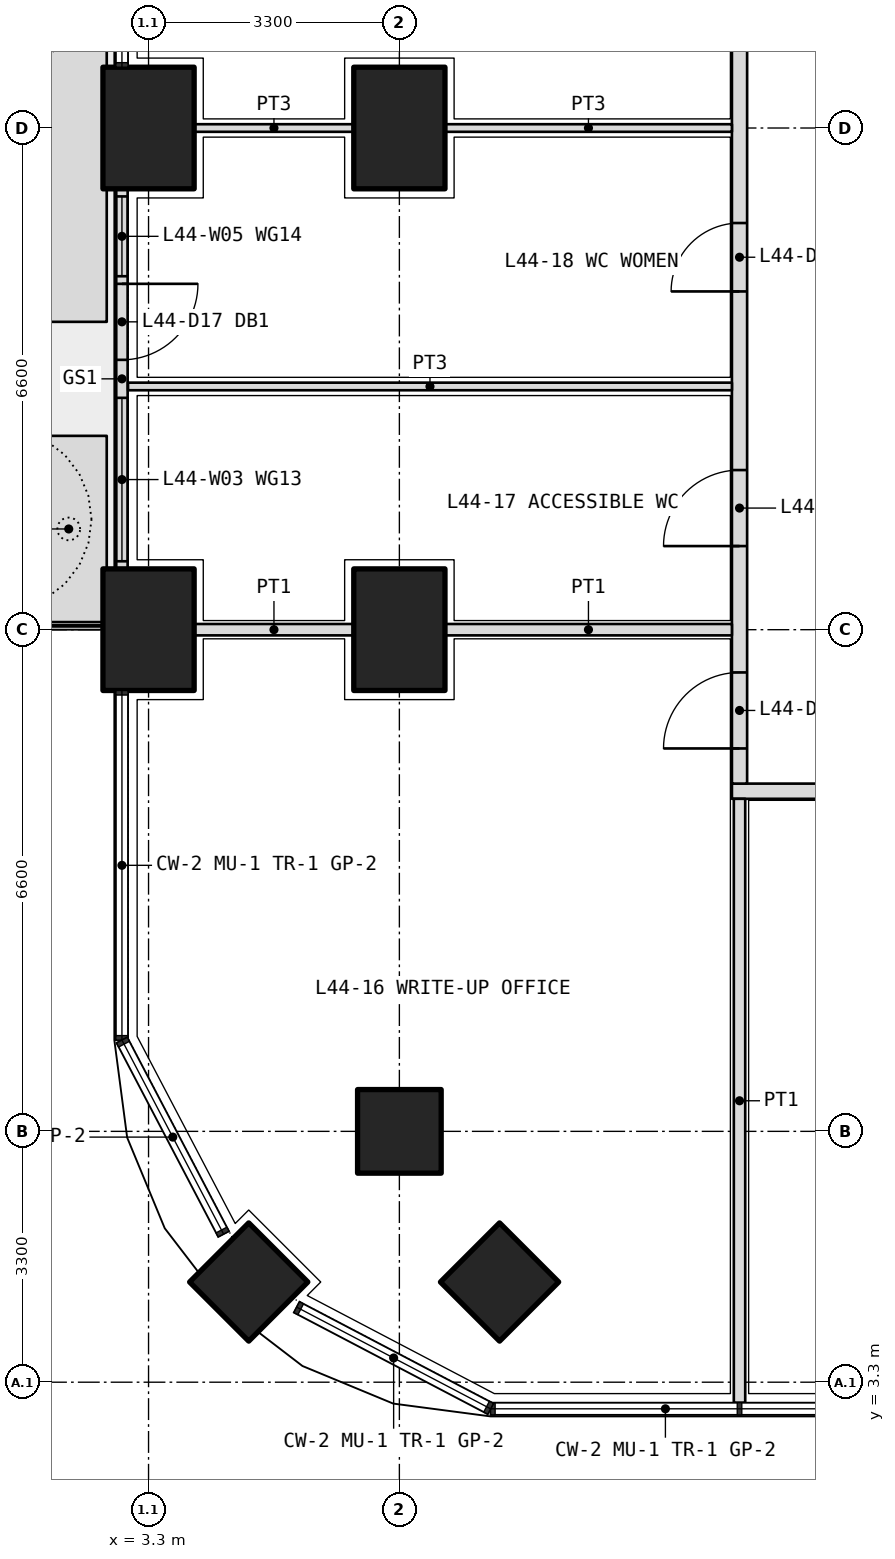
"""IFC4 building model, lengths in metres.
Left out: names, types, materials, properties, quantities, classifications, styles, units other than length and angle.
Written with IfcOpenShell. Run it as: python <this file> out.ifc"""

import sys

from ifc_helpers import new_model, si_unit, direction, frame, frame_2d, origin, origin_2d, place, context, subcontext, project, spatial, polyline, rectangle, outline, extrude, element, fill, save


model = new_model("IFC4")
c1 = context("Model", 3, precision=1e-05, world=origin(), true_north=direction((0.0, 1.0)))
c2 = subcontext(c1, "Body", "Model", "MODEL_VIEW")
j1 = project(units=[si_unit("LENGTHUNIT", "METRE"), si_unit("PLANEANGLEUNIT", "RADIAN")], contexts=[c1])
p1 = place(None, origin())
s1 = spatial("IfcSite", under=j1, at=p1, CompositionType="ELEMENT")
p2 = place(p1, origin())
s2 = spatial("IfcBuilding", under=s1, at=p2, CompositionType="ELEMENT")
p3 = place(p2, frame((0.0, 0.0, 193.5)))
s3 = spatial("IfcBuildingStorey", under=s2, at=p3, CompositionType="ELEMENT", Elevation=193.5)
p4 = place(p3, frame((4.618, 4.618, 0.0), z_axis=(0.0, 0.0, 1.0), x_axis=(0.707106781187, 0.707106781187, 0.0)))
e1 = element("IfcColumn", 1, at=p4, inside=s3, PredefinedType="COLUMN", context=c2, shape_type="SweptSolid", body=[
    extrude(rectangle(XDim=1.1, YDim=1.1, at=origin_2d()), origin(), (0.0, 0.0, 1.0), 4.2),
])
for number, where, z_axis, x_axis in (
    (2, (3.3, 13.2, 0.0), (0.0, 0.0, 1.0), (0.0, 1.0, 0.0)),
    (3, (3.3, 19.8, 0.0), (0.0, 0.0, 1.0), (0.0, 1.0, 0.0)),
):
    element("IfcColumn", number, at=place(p3, frame(where, z_axis=z_axis, x_axis=x_axis)), inside=s3, PredefinedType="COLUMN", context=c2, shape_type="SweptSolid", body=[
        extrude(rectangle(XDim=1.6, YDim=1.2, at=origin_2d()), origin(), (0.0, 0.0, 1.0), 4.2),
    ])
for number, where, z_axis, x_axis in (
    (4, (6.6, 6.6, 0.0), (0.0, 0.0, 1.0), (1.0, 0.0, 0.0)),
    (5, (7.918, 4.618, 0.0), (0.0, 0.0, 1.0), (0.707, 0.707, 0.0)),
):
    element("IfcColumn", number, at=place(p3, frame(where, z_axis=z_axis, x_axis=x_axis)), inside=s3, PredefinedType="COLUMN", context=c2, shape_type="SweptSolid", body=[
        extrude(rectangle(XDim=1.1, YDim=1.1, at=origin_2d()), origin(), (0.0, 0.0, 1.0), 4.2),
    ])
for number, where, z_axis, x_axis in (
    (6, (6.6, 13.2, 0.0), (0.0, 0.0, 1.0), (0.0, 1.0, 0.0)),
    (7, (6.6, 19.8, 0.0), (0.0, 0.0, 1.0), (0.0, 1.0, 0.0)),
):
    element("IfcColumn", number, at=place(p3, frame(where, z_axis=z_axis, x_axis=x_axis)), inside=s3, PredefinedType="COLUMN", context=c2, shape_type="SweptSolid", body=[
        extrude(rectangle(XDim=1.6, YDim=1.2, at=origin_2d()), origin(), (0.0, 0.0, 1.0), 4.2),
    ])
p5 = place(p3, origin())
e8 = element("IfcWall", 8, at=p5, inside=s3, PredefinedType="USERDEFINED", context=c2, shape_type="SweptSolid", body=[
    extrude(outline(polyline([(1.75, 13.3), (2.75, 13.3), (2.75, 15.75), (1.75, 15.75), (1.75, 13.3)]), holes=[polyline([(1.9, 13.45), (2.6, 13.45), (2.6, 15.6), (1.9, 15.6), (1.9, 13.45)])]), origin(), (0.0, 0.0, 1.0), 1.05),
])
p6 = place(p3, origin())
e9 = element("IfcWall", 9, at=p6, inside=s3, PredefinedType="USERDEFINED", context=c2, shape_type="SweptSolid", body=[
    extrude(outline(polyline([(1.75, 17.25), (2.75, 17.25), (2.75, 26.3), (1.75, 26.3), (1.75, 17.25)]), holes=[polyline([(1.9, 17.4), (2.6, 17.4), (2.6, 26.15), (1.9, 26.15), (1.9, 17.4)])]), origin(), (0.0, 0.0, 1.0), 1.05),
])
p7 = place(p3, frame((2.95, 19.0, 0.0), z_axis=(0.0, 0.0, 1.0), x_axis=(0.0, -1.0, 0.0)))
e10 = element("IfcWall", 10, at=p7, inside=s3, PredefinedType="SOLIDWALL", context=c2, shape_type="SweptSolid", body=[
    extrude(rectangle(XDim=5.0, YDim=0.15, at=frame_2d((2.5, 0.0))), origin(), (0.0, 0.0, 1.0), 2.7),
])
p8 = place(p7, frame((1.25, 0.0, 0.0)))
e11 = element("IfcOpeningElement", 11, at=p8, cuts=e10, PredefinedType="OPENING", context=c2, shape_type="SweptSolid", body=[
    extrude(rectangle(XDim=1.0, YDim=2.4, at=frame_2d((0.5, 1.2))), frame((0.0, 0.085, 0.0), z_axis=(0.0, -1.0, 0.0), x_axis=(1.0, 0.0, 0.0)), (0.0, 0.0, 1.0), 0.17),
])
p9 = place(p7, frame((0.1, 0.0, 0.1)))
e12 = element("IfcOpeningElement", 12, at=p9, cuts=e10, PredefinedType="OPENING", context=c2, shape_type="SweptSolid", body=[
    extrude(rectangle(XDim=1.05, YDim=2.3, at=frame_2d((0.525, 1.15))), frame((0.0, 0.085, 0.0), z_axis=(0.0, -1.0, 0.0), x_axis=(1.0, 0.0, 0.0)), (0.0, 0.0, 1.0), 0.17),
])
p10 = place(p7, frame((2.75, 0.0, 0.1)))
e13 = element("IfcOpeningElement", 13, at=p10, cuts=e10, PredefinedType="OPENING", context=c2, shape_type="SweptSolid", body=[
    extrude(rectangle(XDim=2.15, YDim=2.3, at=frame_2d((1.075, 1.15))), frame((0.0, 0.085, 0.0), z_axis=(0.0, -1.0, 0.0), x_axis=(1.0, 0.0, 0.0)), (0.0, 0.0, 1.0), 0.17),
])
p11 = place(p3, frame((10.975, 11.075, 0.0), z_axis=(0.0, 0.0, 1.0), x_axis=(1.0, 0.0, 0.0)))
e14 = element("IfcWall", 14, at=p11, inside=s3, PredefinedType="PARTITIONING", context=c2, shape_type="SweptSolid", body=[
    extrude(rectangle(XDim=30.85, YDim=0.2, at=frame_2d((15.425, 0.0))), origin(), (0.0, 0.0, 1.0), 2.85),
])
p12 = place(p11, frame((5.512, 0.0, 0.0)))
e15 = element("IfcOpeningElement", 15, at=p12, cuts=e14, PredefinedType="OPENING", context=c2, shape_type="SweptSolid", body=[
    extrude(rectangle(XDim=1.2, YDim=2.1, at=frame_2d((0.6, 1.05))), frame((0.0, 0.11, 0.0), z_axis=(0.0, -1.0, 0.0), x_axis=(1.0, 0.0, 0.0)), (0.0, 0.0, 1.0), 0.22),
])
p13 = place(p11, frame((13.725, 0.0, 0.0)))
e16 = element("IfcOpeningElement", 16, at=p13, cuts=e14, PredefinedType="OPENING", context=c2, shape_type="SweptSolid", body=[
    extrude(rectangle(XDim=1.0, YDim=2.1, at=frame_2d((0.5, 1.05))), frame((0.0, 0.11, 0.0), z_axis=(0.0, -1.0, 0.0), x_axis=(1.0, 0.0, 0.0)), (0.0, 0.0, 1.0), 0.22),
])
p14 = place(p11, frame((17.025, 0.0, 0.0)))
e17 = element("IfcOpeningElement", 17, at=p14, cuts=e14, PredefinedType="OPENING", context=c2, shape_type="SweptSolid", body=[
    extrude(rectangle(XDim=1.0, YDim=2.1, at=frame_2d((0.5, 1.05))), frame((0.0, 0.11, 0.0), z_axis=(0.0, -1.0, 0.0), x_axis=(1.0, 0.0, 0.0)), (0.0, 0.0, 1.0), 0.22),
])
p15 = place(p11, frame((24.238, 0.0, 0.0)))
e18 = element("IfcOpeningElement", 18, at=p15, cuts=e14, PredefinedType="OPENING", context=c2, shape_type="SweptSolid", body=[
    extrude(rectangle(XDim=1.0, YDim=2.1, at=frame_2d((0.5, 1.05))), frame((0.0, 0.11, 0.0), z_axis=(0.0, -1.0, 0.0), x_axis=(1.0, 0.0, 0.0)), (0.0, 0.0, 1.0), 0.22),
])
p16 = place(p3, frame((11.075, 11.175, 0.0), z_axis=(0.0, 0.0, 1.0), x_axis=(0.0, 1.0, 0.0)))
e19 = element("IfcWall", 19, at=p16, inside=s3, PredefinedType="PARTITIONING", context=c2, shape_type="SweptSolid", body=[
    extrude(rectangle(XDim=23.85, YDim=0.2, at=frame_2d((11.925, 0.0))), origin(), (0.0, 0.0, 1.0), 2.85),
])
p17 = place(p16, frame((0.462, 0.0, 0.0)))
e20 = element("IfcOpeningElement", 20, at=p17, cuts=e19, PredefinedType="OPENING", context=c2, shape_type="SweptSolid", body=[
    extrude(rectangle(XDim=1.0, YDim=2.1, at=frame_2d((0.5, 1.05))), frame((0.0, 0.11, 0.0), z_axis=(0.0, -1.0, 0.0), x_axis=(1.0, 0.0, 0.0)), (0.0, 0.0, 1.0), 0.22),
])
p18 = place(p16, frame((3.125, 0.0, 0.0)))
e21 = element("IfcOpeningElement", 21, at=p18, cuts=e19, PredefinedType="OPENING", context=c2, shape_type="SweptSolid", body=[
    extrude(rectangle(XDim=1.0, YDim=2.1, at=frame_2d((0.5, 1.05))), frame((0.0, 0.11, 0.0), z_axis=(0.0, -1.0, 0.0), x_axis=(1.0, 0.0, 0.0)), (0.0, 0.0, 1.0), 0.22),
])
p19 = place(p16, frame((6.475, 0.0, 0.0)))
e22 = element("IfcOpeningElement", 22, at=p19, cuts=e19, PredefinedType="OPENING", context=c2, shape_type="SweptSolid", body=[
    extrude(rectangle(XDim=0.9, YDim=2.1, at=frame_2d((0.45, 1.05))), frame((0.0, 0.11, 0.0), z_axis=(0.0, -1.0, 0.0), x_axis=(1.0, 0.0, 0.0)), (0.0, 0.0, 1.0), 0.22),
])
p20 = place(p16, frame((9.675, 0.0, 0.0)))
e23 = element("IfcOpeningElement", 23, at=p20, cuts=e19, PredefinedType="OPENING", context=c2, shape_type="SweptSolid", body=[
    extrude(rectangle(XDim=0.9, YDim=2.1, at=frame_2d((0.45, 1.05))), frame((0.0, 0.11, 0.0), z_axis=(0.0, -1.0, 0.0), x_axis=(1.0, 0.0, 0.0)), (0.0, 0.0, 1.0), 0.22),
])
p21 = place(p16, frame((12.925, 0.0, 0.0)))
e24 = element("IfcOpeningElement", 24, at=p21, cuts=e19, PredefinedType="OPENING", context=c2, shape_type="SweptSolid", body=[
    extrude(rectangle(XDim=1.0, YDim=2.1, at=frame_2d((0.5, 1.05))), frame((0.0, 0.11, 0.0), z_axis=(0.0, -1.0, 0.0), x_axis=(1.0, 0.0, 0.0)), (0.0, 0.0, 1.0), 0.22),
])
p22 = place(p16, frame((17.925, 0.0, 0.0)))
e25 = element("IfcOpeningElement", 25, at=p22, cuts=e19, PredefinedType="OPENING", context=c2, shape_type="SweptSolid", body=[
    extrude(rectangle(XDim=1.2, YDim=2.1, at=frame_2d((0.6, 1.05))), frame((0.0, 0.11, 0.0), z_axis=(0.0, -1.0, 0.0), x_axis=(1.0, 0.0, 0.0)), (0.0, 0.0, 1.0), 0.22),
])
p23 = place(p16, frame((22.288, 0.0, 0.0)))
e26 = element("IfcOpeningElement", 26, at=p23, cuts=e19, PredefinedType="OPENING", context=c2, shape_type="SweptSolid", body=[
    extrude(rectangle(XDim=1.2, YDim=2.1, at=frame_2d((0.6, 1.05))), frame((0.0, 0.11, 0.0), z_axis=(0.0, -1.0, 0.0), x_axis=(1.0, 0.0, 0.0)), (0.0, 0.0, 1.0), 0.22),
])
p24 = place(p3, frame((11.075, 3.03, 0.0), z_axis=(0.0, 0.0, 1.0), x_axis=(0.0, 1.0, 0.0)))
e27 = element("IfcWall", 27, at=p24, inside=s3, PredefinedType="PARTITIONING", context=c2, shape_type="SweptSolid", body=[
    extrude(rectangle(XDim=7.945, YDim=0.15, at=frame_2d((3.973, 0.0))), origin(), (0.0, 0.0, 1.0), 2.7),
])
p25 = place(p3, frame((3.03, 16.4, 0.0), z_axis=(0.0, 0.0, 1.0), x_axis=(1.0, 0.0, 0.0)))
e28 = element("IfcWall", 28, at=p25, inside=s3, PredefinedType="PARTITIONING", context=c2, shape_type="SweptSolid", body=[
    extrude(rectangle(XDim=7.945, YDim=0.1, at=frame_2d((3.973, 0.0))), origin(), (0.0, 0.0, 1.0), 2.7),
])
p26 = place(p3, frame((3.9, 19.8, 0.0), z_axis=(0.0, 0.0, 1.0), x_axis=(1.0, 0.0, 0.0)))
e29 = element("IfcWall", 29, at=p26, inside=s3, PredefinedType="PARTITIONING", context=c2, shape_type="SweptSolid", body=[
    extrude(rectangle(XDim=2.1, YDim=0.1, at=frame_2d((1.05, 0.0))), origin(), (0.0, 0.0, 1.0), 2.85),
])
p27 = place(p3, frame((7.2, 19.8, 0.0), z_axis=(0.0, 0.0, 1.0), x_axis=(1.0, 0.0, 0.0)))
e30 = element("IfcWall", 30, at=p27, inside=s3, PredefinedType="PARTITIONING", context=c2, shape_type="SweptSolid", body=[
    extrude(rectangle(XDim=3.775, YDim=0.1, at=frame_2d((1.888, 0.0))), origin(), (0.0, 0.0, 1.0), 2.85),
])
p28 = place(p3, frame((3.9, 13.2, 0.0), z_axis=(0.0, 0.0, 1.0), x_axis=(1.0, 0.0, 0.0)))
e31 = element("IfcWall", 31, at=p28, inside=s3, PredefinedType="PARTITIONING", context=c2, shape_type="SweptSolid", body=[
    extrude(rectangle(XDim=2.1, YDim=0.15, at=frame_2d((1.05, 0.0))), origin(), (0.0, 0.0, 1.0), 2.85),
])
p29 = place(p3, frame((7.2, 13.2, 0.0), z_axis=(0.0, 0.0, 1.0), x_axis=(1.0, 0.0, 0.0)))
e32 = element("IfcWall", 32, at=p29, inside=s3, PredefinedType="PARTITIONING", context=c2, shape_type="SweptSolid", body=[
    extrude(rectangle(XDim=3.775, YDim=0.15, at=frame_2d((1.888, 0.0))), origin(), (0.0, 0.0, 1.0), 2.85),
])
p30 = place(p8, origin())
e33 = element("IfcDoor", 33, at=p30, inside=s3, OperationType="SINGLE_SWING_LEFT", PredefinedType="DOOR", context=c2, shape_type="SweptSolid", body=[
    extrude(rectangle(XDim=1.0, YDim=2.4, at=frame_2d((0.5, 1.2))), frame((0.0, 0.025, 0.0), z_axis=(0.0, -1.0, 0.0), x_axis=(1.0, 0.0, 0.0)), (0.0, 0.0, 1.0), 0.05),
])
fill(e11, e33)
p31 = place(p9, origin())
e34 = element("IfcWindow", 34, at=p31, inside=s3, PartitioningType="SINGLE_PANEL", PredefinedType="WINDOW", context=c2, shape_type="SweptSolid", body=[
    extrude(rectangle(XDim=1.05, YDim=2.3, at=frame_2d((0.525, 1.15))), frame((0.0, 0.03, 0.0), z_axis=(0.0, -1.0, 0.0), x_axis=(1.0, 0.0, 0.0)), (0.0, 0.0, 1.0), 0.06),
])
fill(e12, e34)
p32 = place(p10, origin())
e35 = element("IfcWindow", 35, at=p32, inside=s3, PartitioningType="SINGLE_PANEL", PredefinedType="WINDOW", context=c2, shape_type="SweptSolid", body=[
    extrude(rectangle(XDim=2.15, YDim=2.3, at=frame_2d((1.075, 1.15))), frame((0.0, 0.03, 0.0), z_axis=(0.0, -1.0, 0.0), x_axis=(1.0, 0.0, 0.0)), (0.0, 0.0, 1.0), 0.06),
])
fill(e13, e35)
p33 = place(p17, origin())
e36 = element("IfcDoor", 36, at=p33, inside=s3, OperationType="SINGLE_SWING_LEFT", PredefinedType="DOOR", context=c2, shape_type="SweptSolid", body=[
    extrude(rectangle(XDim=1.0, YDim=2.1, at=frame_2d((0.5, 1.05))), frame((0.0, 0.025, 0.0), z_axis=(0.0, -1.0, 0.0), x_axis=(1.0, 0.0, 0.0)), (0.0, 0.0, 1.0), 0.05),
])
fill(e20, e36)
p34 = place(p18, origin())
e37 = element("IfcDoor", 37, at=p34, inside=s3, OperationType="SINGLE_SWING_LEFT", PredefinedType="DOOR", context=c2, shape_type="SweptSolid", body=[
    extrude(rectangle(XDim=1.0, YDim=2.1, at=frame_2d((0.5, 1.05))), frame((0.0, 0.025, 0.0), z_axis=(0.0, -1.0, 0.0), x_axis=(1.0, 0.0, 0.0)), (0.0, 0.0, 1.0), 0.05),
])
fill(e21, e37)
p35 = place(p19, origin())
e38 = element("IfcDoor", 38, at=p35, inside=s3, OperationType="SINGLE_SWING_LEFT", PredefinedType="DOOR", context=c2, shape_type="SweptSolid", body=[
    extrude(rectangle(XDim=0.9, YDim=2.1, at=frame_2d((0.45, 1.05))), frame((0.0, 0.025, 0.0), z_axis=(0.0, -1.0, 0.0), x_axis=(1.0, 0.0, 0.0)), (0.0, 0.0, 1.0), 0.05),
])
fill(e22, e38)
save(model, sys.argv[1])
